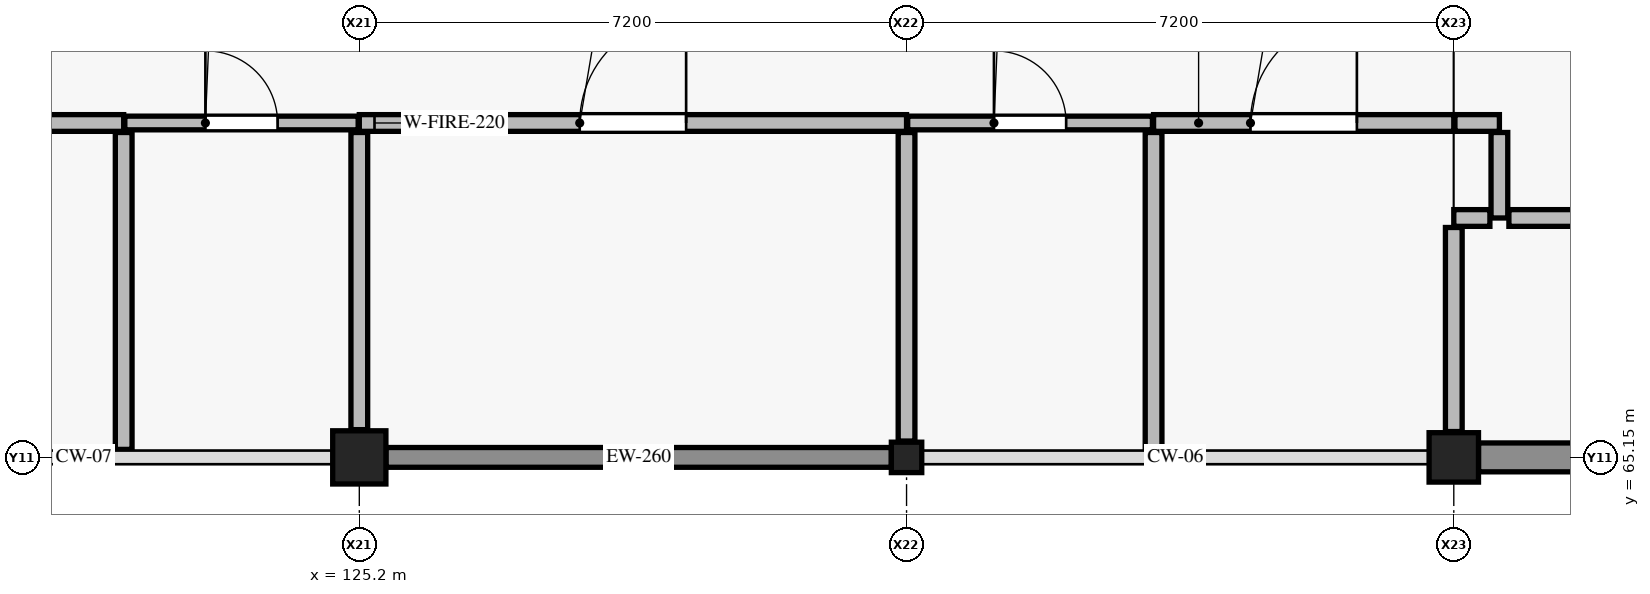
"""IFC4 building model, lengths in metres.
Left out: names, types, materials, properties, quantities, classifications, styles, units other than length and angle.
Written with IfcOpenShell. Run it as: python <this file> out.ifc"""

import sys

from ifc_helpers import new_model, si_unit, direction, frame, frame_2d, origin, origin_2d, place, context, subcontext, project, spatial, rectangle, circle, extrude, element, fill, save


model = new_model("IFC4")
c1 = context("Model", 3, precision=1e-05, world=origin(), true_north=direction((0.0, 1.0)))
c2 = subcontext(c1, "Body", "Model", "MODEL_VIEW")
j1 = project(units=[si_unit("LENGTHUNIT", "METRE"), si_unit("PLANEANGLEUNIT", "RADIAN")], contexts=[c1])
p1 = place(None, origin())
s1 = spatial("IfcSite", under=j1, at=p1, CompositionType="ELEMENT")
p2 = place(p1, origin())
s2 = spatial("IfcBuilding", under=s1, at=p2, CompositionType="ELEMENT")
p3 = place(p2, frame((0.0, 0.0, 4.8)))
s3 = spatial("IfcBuildingStorey", under=s2, at=p3, CompositionType="ELEMENT", Elevation=4.8)
p4 = place(p3, frame((125.2, 65.15, 0.0), z_axis=(0.0, 0.0, 1.0), x_axis=(1.0, 0.0, 0.0)))
e1 = element("IfcColumn", 1, at=p4, inside=s3, PredefinedType="COLUMN", context=c2, shape_type="SweptSolid", body=[
    extrude(circle(Radius=0.35, at=origin_2d()), origin(), (0.0, 0.0, 1.0), 4.2),
])
p5 = place(p3, frame((132.4, 65.15, 0.0), z_axis=(0.0, 0.0, 1.0), x_axis=(1.0, 0.0, 0.0)))
e2 = element("IfcColumn", 2, at=p5, inside=s3, PredefinedType="COLUMN", context=c2, shape_type="SweptSolid", body=[
    extrude(rectangle(XDim=0.4, YDim=0.4, at=origin_2d()), origin(), (0.0, 0.0, 1.0), 4.2),
])
p6 = place(p3, frame((139.6, 65.15, 0.0), z_axis=(0.0, 0.0, 1.0), x_axis=(1.0, 0.0, 0.0)))
e3 = element("IfcColumn", 3, at=p6, inside=s3, PredefinedType="COLUMN", context=c2, shape_type="SweptSolid", body=[
    extrude(rectangle(XDim=0.65, YDim=0.65, at=origin_2d()), origin(), (0.0, 0.0, 1.0), 4.2),
])
p7 = place(p3, frame((146.575, 65.15, 0.0), z_axis=(0.0, 0.0, 1.0), x_axis=(-1.0, 0.0, 0.0)))
e4 = element("IfcWall", 4, at=p7, inside=s3, PredefinedType="USERDEFINED", context=c2, shape_type="SweptSolid", body=[
    extrude(rectangle(XDim=6.65, YDim=0.38, at=frame_2d((3.325, 0.0))), origin(), (0.0, 0.0, 1.0), 3.13),
])
p8 = place(p7, frame((3.025, 0.0, 0.9)))
e5 = element("IfcOpeningElement", 5, at=p8, cuts=e4, PredefinedType="OPENING", context=c2, shape_type="SweptSolid", body=[
    extrude(rectangle(XDim=0.6, YDim=1.8, at=frame_2d((0.3, 0.9))), frame((0.0, 0.2, 0.0), z_axis=(0.0, -1.0, 0.0), x_axis=(1.0, 0.0, 0.0)), (0.0, 0.0, 1.0), 0.4),
])
p9 = place(p3, frame((132.2, 65.15, 0.0), z_axis=(0.0, 0.0, 1.0), x_axis=(-1.0, 0.0, 0.0)))
e6 = element("IfcWall", 6, at=p9, inside=s3, PredefinedType="SOLIDWALL", context=c2, shape_type="SweptSolid", body=[
    extrude(rectangle(XDim=6.65, YDim=0.26, at=frame_2d((3.325, 0.0))), origin(), (0.0, 0.0, 1.0), 3.13),
])
p10 = place(p9, frame((2.95, 0.0, 0.9)))
e7 = element("IfcOpeningElement", 7, at=p10, cuts=e6, PredefinedType="OPENING", context=c2, shape_type="SweptSolid", body=[
    extrude(rectangle(XDim=0.75, YDim=1.8, at=frame_2d((0.375, 0.9))), frame((0.0, 0.14, 0.0), z_axis=(0.0, -1.0, 0.0), x_axis=(1.0, 0.0, 0.0)), (0.0, 0.0, 1.0), 0.28),
])
p11 = place(p3, frame((120.525, 69.55, 0.0), z_axis=(0.0, 0.0, 1.0), x_axis=(1.0, 0.0, 0.0)))
e8 = element("IfcWall", 8, at=p11, inside=s3, PredefinedType="PARTITIONING", context=c2, shape_type="SweptSolid", body=[
    extrude(rectangle(XDim=1.575, YDim=0.22, at=frame_2d((0.788, 0.0))), origin(), (0.0, 0.0, 1.0), 3.95),
])
p12 = place(p3, frame((125.2, 69.55, 0.0), z_axis=(0.0, 0.0, 1.0), x_axis=(1.0, 0.0, 0.0)))
e9 = element("IfcWall", 9, at=p12, inside=s3, PredefinedType="PARTITIONING", context=c2, shape_type="SweptSolid", body=[
    extrude(rectangle(XDim=7.2, YDim=0.22, at=frame_2d((3.6, 0.0))), origin(), (0.0, 0.0, 1.0), 3.235),
])
p13 = place(p12, frame((2.9, 0.0, 0.0)))
e10 = element("IfcOpeningElement", 10, at=p13, cuts=e9, PredefinedType="OPENING", context=c2, shape_type="SweptSolid", body=[
    extrude(rectangle(XDim=1.4, YDim=2.2, at=frame_2d((0.7, 1.1))), frame((0.0, 0.12, 0.0), z_axis=(0.0, -1.0, 0.0), x_axis=(1.0, 0.0, 0.0)), (0.0, 0.0, 1.0), 0.24),
])
p14 = place(p12, frame((0.2, 0.0, 1.05)))
e11 = element("IfcOpeningElement", 11, at=p14, cuts=e9, PredefinedType="OPENING", context=c2, shape_type="SweptSolid", body=[
    extrude(rectangle(XDim=1.4, YDim=1.1, at=frame_2d((0.7, 0.55))), frame((0.0, 0.12, 0.0), z_axis=(0.0, -1.0, 0.0), x_axis=(1.0, 0.0, 0.0)), (0.0, 0.0, 1.0), 0.24),
])
p15 = place(p3, frame((135.65, 69.55, 0.0), z_axis=(0.0, 0.0, 1.0), x_axis=(1.0, 0.0, 0.0)))
e12 = element("IfcWall", 12, at=p15, inside=s3, PredefinedType="PARTITIONING", context=c2, shape_type="SweptSolid", body=[
    extrude(rectangle(XDim=3.95, YDim=0.22, at=frame_2d((1.975, 0.0))), origin(), (0.0, 0.0, 1.0), 3.385),
])
p16 = place(p15, frame((1.275, 0.0, 0.0)))
e13 = element("IfcOpeningElement", 13, at=p16, cuts=e12, PredefinedType="OPENING", context=c2, shape_type="SweptSolid", body=[
    extrude(rectangle(XDim=1.4, YDim=2.2, at=frame_2d((0.7, 1.1))), frame((0.0, 0.12, 0.0), z_axis=(0.0, -1.0, 0.0), x_axis=(1.0, 0.0, 0.0)), (0.0, 0.0, 1.0), 0.24),
])
p17 = place(p3, frame((139.615, 69.55, 0.0), z_axis=(0.0, 0.0, 1.0), x_axis=(1.0, 0.0, 0.0)))
e14 = element("IfcWall", 14, at=p17, inside=s3, PredefinedType="PARTITIONING", context=c2, shape_type="SweptSolid", body=[
    extrude(rectangle(XDim=0.585, YDim=0.22, at=frame_2d((0.292, 0.0))), origin(), (0.0, 0.0, 1.0), 3.385),
])
p18 = place(p3, frame((140.2, 68.3, 0.0), z_axis=(0.0, 0.0, 1.0), x_axis=(0.0, 1.0, 0.0)))
e15 = element("IfcWall", 15, at=p18, inside=s3, PredefinedType="PARTITIONING", context=c2, shape_type="SweptSolid", body=[
    extrude(rectangle(XDim=1.125, YDim=0.22, at=frame_2d((0.562, 0.0))), origin(), (0.0, 0.0, 1.0), 3.95),
])
p19 = place(p3, frame((139.6, 68.3, 0.0), z_axis=(0.0, 0.0, 1.0), x_axis=(1.0, 0.0, 0.0)))
e16 = element("IfcWall", 16, at=p19, inside=s3, PredefinedType="PARTITIONING", context=c2, shape_type="SweptSolid", body=[
    extrude(rectangle(XDim=0.475, YDim=0.22, at=frame_2d((0.237, 0.0))), origin(), (0.0, 0.0, 1.0), 3.385),
])
p20 = place(p3, frame((140.325, 68.3, 0.0), z_axis=(0.0, 0.0, 1.0), x_axis=(1.0, 0.0, 0.0)))
e17 = element("IfcWall", 17, at=p20, inside=s3, PredefinedType="PARTITIONING", context=c2, shape_type="SweptSolid", body=[
    extrude(rectangle(XDim=2.16, YDim=0.22, at=frame_2d((1.08, 0.0))), origin(), (0.0, 0.0, 1.0), 3.95),
])
p21 = place(p3, frame((122.115, 69.55, 0.0), z_axis=(0.0, 0.0, 1.0), x_axis=(1.0, 0.0, 0.0)))
e18 = element("IfcWall", 18, at=p21, inside=s3, PredefinedType="PLUMBINGWALL", context=c2, shape_type="SweptSolid", body=[
    extrude(rectangle(XDim=3.07, YDim=0.18, at=frame_2d((1.535, 0.0))), origin(), (0.0, 0.0, 1.0), 3.355),
])
p22 = place(p21, frame((1.06, 0.0, 0.0)))
e19 = element("IfcOpeningElement", 19, at=p22, cuts=e18, PredefinedType="OPENING", context=c2, shape_type="SweptSolid", body=[
    extrude(rectangle(XDim=0.95, YDim=2.1, at=frame_2d((0.475, 1.05))), frame((0.0, 0.1, 0.0), z_axis=(0.0, -1.0, 0.0), x_axis=(1.0, 0.0, 0.0)), (0.0, 0.0, 1.0), 0.2),
])
p23 = place(p3, frame((132.415, 69.55, 0.0), z_axis=(0.0, 0.0, 1.0), x_axis=(1.0, 0.0, 0.0)))
e20 = element("IfcWall", 20, at=p23, inside=s3, PredefinedType="PLUMBINGWALL", context=c2, shape_type="SweptSolid", body=[
    extrude(rectangle(XDim=3.22, YDim=0.18, at=frame_2d((1.61, 0.0))), origin(), (0.0, 0.0, 1.0), 3.235),
])
p24 = place(p23, frame((1.135, 0.0, 0.0)))
e21 = element("IfcOpeningElement", 21, at=p24, cuts=e20, PredefinedType="OPENING", context=c2, shape_type="SweptSolid", body=[
    extrude(rectangle(XDim=0.95, YDim=2.1, at=frame_2d((0.475, 1.05))), frame((0.0, 0.1, 0.0), z_axis=(0.0, -1.0, 0.0), x_axis=(1.0, 0.0, 0.0)), (0.0, 0.0, 1.0), 0.2),
])
p25 = place(p3, frame((122.1, 65.255, 0.0), z_axis=(0.0, 0.0, 1.0), x_axis=(0.0, 1.0, 0.0)))
e22 = element("IfcWall", 22, at=p25, inside=s3, PredefinedType="PARTITIONING", context=c2, shape_type="SweptSolid", body=[
    extrude(rectangle(XDim=4.17, YDim=0.22, at=frame_2d((2.085, 0.0))), origin(), (0.0, 0.0, 1.0), 3.515),
])
p26 = place(p3, frame((125.2, 65.515, 0.0), z_axis=(0.0, 0.0, 1.0), x_axis=(0.0, 1.0, 0.0)))
e23 = element("IfcWall", 23, at=p26, inside=s3, PredefinedType="PARTITIONING", context=c2, shape_type="SweptSolid", body=[
    extrude(rectangle(XDim=3.91, YDim=0.22, at=frame_2d((1.955, 0.0))), origin(), (0.0, 0.0, 1.0), 3.355),
])
p27 = place(p3, frame((132.4, 65.365, 0.0), z_axis=(0.0, 0.0, 1.0), x_axis=(0.0, 1.0, 0.0)))
e24 = element("IfcWall", 24, at=p27, inside=s3, PredefinedType="PARTITIONING", context=c2, shape_type="SweptSolid", body=[
    extrude(rectangle(XDim=4.06, YDim=0.22, at=frame_2d((2.03, 0.0))), origin(), (0.0, 0.0, 1.0), 3.235),
])
p28 = place(p3, frame((135.65, 65.255, 0.0), z_axis=(0.0, 0.0, 1.0), x_axis=(0.0, 1.0, 0.0)))
e25 = element("IfcWall", 25, at=p28, inside=s3, PredefinedType="PARTITIONING", context=c2, shape_type="SweptSolid", body=[
    extrude(rectangle(XDim=4.17, YDim=0.22, at=frame_2d((2.085, 0.0))), origin(), (0.0, 0.0, 1.0), 3.515),
])
p29 = place(p3, frame((139.6, 65.49, 0.0), z_axis=(0.0, 0.0, 1.0), x_axis=(0.0, 1.0, 0.0)))
e26 = element("IfcWall", 26, at=p29, inside=s3, PredefinedType="PARTITIONING", context=c2, shape_type="SweptSolid", body=[
    extrude(rectangle(XDim=2.685, YDim=0.22, at=frame_2d((1.343, 0.0))), origin(), (0.0, 0.0, 1.0), 3.385),
])
p30 = place(p10, origin())
e27 = element("IfcWindow", 27, at=p30, inside=s3, PartitioningType="SINGLE_PANEL", PredefinedType="WINDOW", context=c2, shape_type="SweptSolid", body=[
    extrude(rectangle(XDim=0.75, YDim=1.8, at=frame_2d((0.375, 0.9))), frame((0.0, 0.03, 0.0), z_axis=(0.0, -1.0, 0.0), x_axis=(1.0, 0.0, 0.0)), (0.0, 0.0, 1.0), 0.06),
])
fill(e7, e27)
p31 = place(p22, origin())
e28 = element("IfcDoor", 28, at=p31, inside=s3, OperationType="SINGLE_SWING_LEFT", PredefinedType="DOOR", context=c2, shape_type="SweptSolid", body=[
    extrude(rectangle(XDim=0.95, YDim=2.1, at=frame_2d((0.475, 1.05))), frame((0.0, 0.025, 0.0), z_axis=(0.0, -1.0, 0.0), x_axis=(1.0, 0.0, 0.0)), (0.0, 0.0, 1.0), 0.05),
])
fill(e19, e28)
p32 = place(p13, origin())
e29 = element("IfcDoor", 29, at=p32, inside=s3, OperationType="SINGLE_SWING_RIGHT", PredefinedType="DOOR", context=c2, shape_type="SweptSolid", body=[
    extrude(rectangle(XDim=1.4, YDim=2.2, at=frame_2d((0.7, 1.1))), frame((0.0, 0.025, 0.0), z_axis=(0.0, -1.0, 0.0), x_axis=(1.0, 0.0, 0.0)), (0.0, 0.0, 1.0), 0.05),
])
fill(e10, e29)
p33 = place(p14, origin())
e30 = element("IfcWindow", 30, at=p33, inside=s3, PartitioningType="SINGLE_PANEL", PredefinedType="WINDOW", context=c2, shape_type="SweptSolid", body=[
    extrude(rectangle(XDim=1.4, YDim=1.1, at=frame_2d((0.7, 0.55))), frame((0.0, 0.03, 0.0), z_axis=(0.0, -1.0, 0.0), x_axis=(1.0, 0.0, 0.0)), (0.0, 0.0, 1.0), 0.06),
])
fill(e11, e30)
p34 = place(p24, origin())
e31 = element("IfcDoor", 31, at=p34, inside=s3, OperationType="SINGLE_SWING_LEFT", PredefinedType="DOOR", context=c2, shape_type="SweptSolid", body=[
    extrude(rectangle(XDim=0.95, YDim=2.1, at=frame_2d((0.475, 1.05))), frame((0.0, 0.025, 0.0), z_axis=(0.0, -1.0, 0.0), x_axis=(1.0, 0.0, 0.0)), (0.0, 0.0, 1.0), 0.05),
])
fill(e21, e31)
p35 = place(p16, origin())
e32 = element("IfcDoor", 32, at=p35, inside=s3, OperationType="SINGLE_SWING_RIGHT", PredefinedType="DOOR", context=c2, shape_type="SweptSolid", body=[
    extrude(rectangle(XDim=1.4, YDim=2.2, at=frame_2d((0.7, 1.1))), frame((0.0, 0.025, 0.0), z_axis=(0.0, -1.0, 0.0), x_axis=(1.0, 0.0, 0.0)), (0.0, 0.0, 1.0), 0.05),
])
fill(e13, e32)
save(model, sys.argv[1])
